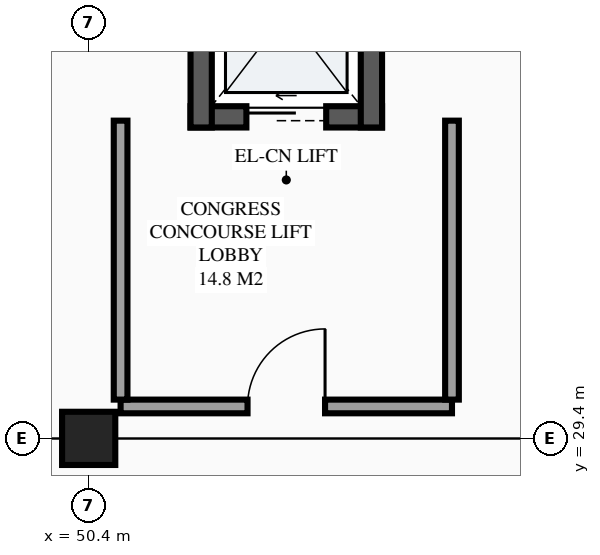
"""IFC4 building model, lengths in metres.
Left out: names, types, materials, properties, quantities, classifications, styles, units other than length and angle.
Written with IfcOpenShell. Run it as: python <this file> out.ifc"""

import sys

from ifc_helpers import new_model, si_unit, direction, frame, frame_2d, origin, origin_2d, place, context, subcontext, project, spatial, rectangle, extrude, element, fill, save


model = new_model("IFC4")
c1 = context("Model", 3, precision=1e-05, world=origin(), true_north=direction((0.0, 1.0)))
c2 = subcontext(c1, "Body", "Model", "MODEL_VIEW")
j1 = project(units=[si_unit("LENGTHUNIT", "METRE"), si_unit("PLANEANGLEUNIT", "RADIAN")], contexts=[c1])
p1 = place(None, origin())
s1 = spatial("IfcSite", under=j1, at=p1, CompositionType="ELEMENT")
p2 = place(p1, origin())
s2 = spatial("IfcBuilding", under=s1, at=p2, CompositionType="ELEMENT")
p3 = place(p2, frame((0.0, 0.0, 9.9)))
s3 = spatial("IfcBuildingStorey", under=s2, at=p3, CompositionType="ELEMENT", Elevation=9.9)
p4 = place(p3, frame((50.4, 29.4, 0.0), z_axis=(0.0, 0.0, 1.0), x_axis=(1.0, 0.0, 0.0)))
e1 = element("IfcColumn", 1, at=p4, inside=s3, PredefinedType="COLUMN", context=c2, shape_type="SweptSolid", body=[
    extrude(rectangle(XDim=0.7, YDim=0.7, at=origin_2d()), origin(), (0.0, 0.0, 1.0), 4.2),
])
p5 = place(p3, frame((51.74, 33.63, 0.0), z_axis=(0.0, 0.0, 1.0), x_axis=(1.0, 0.0, 0.0)))
e2 = element("IfcWall", 2, at=p5, inside=s3, PredefinedType="SHEAR", context=c2, shape_type="SweptSolid", body=[
    extrude(rectangle(XDim=2.52, YDim=0.28, at=frame_2d((1.26, 0.0))), origin(), (0.0, 0.0, 1.0), 4.2),
])
p6 = place(p5, frame((0.735, 0.0, 0.0)))
e3 = element("IfcOpeningElement", 3, at=p6, cuts=e2, PredefinedType="OPENING", context=c2, shape_type="SweptSolid", body=[
    extrude(rectangle(XDim=1.05, YDim=2.2, at=frame_2d((0.525, 1.1))), frame((0.0, 0.15, 0.0), z_axis=(0.0, -1.0, 0.0), x_axis=(1.0, 0.0, 0.0)), (0.0, 0.0, 1.0), 0.3),
])
for number, where, z_axis, x_axis in (
    (4, (54.12, 33.49, 0.0), (0.0, 0.0, 1.0), (0.0, 1.0, 0.0)),
    (5, (51.88, 36.51, 0.0), (0.0, 0.0, 1.0), (0.0, -1.0, 0.0)),
):
    element("IfcWall", number, at=place(p3, frame(where, z_axis=z_axis, x_axis=x_axis)), inside=s3, PredefinedType="SHEAR", context=c2, shape_type="SweptSolid", body=[
        extrude(rectangle(XDim=3.02, YDim=0.28, at=frame_2d((1.51, 0.0))), origin(), (0.0, 0.0, 1.0), 4.2),
    ])
p7 = place(p3, frame((50.82, 29.82, 0.0), z_axis=(0.0, 0.0, 1.0), x_axis=(1.0, 0.0, 0.0)))
e6 = element("IfcWall", 6, at=p7, inside=s3, PredefinedType="PARTITIONING", context=c2, shape_type="SweptSolid", body=[
    extrude(rectangle(XDim=4.36, YDim=0.18, at=frame_2d((2.18, 0.0))), origin(), (0.0, 0.0, 1.0), 3.955),
])
p8 = place(p7, frame((1.67, 0.0, 0.0)))
e7 = element("IfcOpeningElement", 7, at=p8, cuts=e6, PredefinedType="OPENING", context=c2, shape_type="SweptSolid", body=[
    extrude(rectangle(XDim=1.02, YDim=2.15, at=frame_2d((0.51, 1.075))), frame((0.0, 0.1, 0.0), z_axis=(0.0, -1.0, 0.0), x_axis=(1.0, 0.0, 0.0)), (0.0, 0.0, 1.0), 0.2),
])
for number, where, z_axis, x_axis in (
    (8, (50.82, 29.91, 0.0), (0.0, 0.0, 1.0), (0.0, 1.0, 0.0)),
    (9, (55.18, 29.91, 0.0), (0.0, 0.0, 1.0), (0.0, 1.0, 0.0)),
):
    element("IfcWall", number, at=place(p3, frame(where, z_axis=z_axis, x_axis=x_axis)), inside=s3, PredefinedType="PARTITIONING", context=c2, shape_type="SweptSolid", body=[
        extrude(rectangle(XDim=3.67, YDim=0.18, at=frame_2d((1.835, 0.0))), origin(), (0.0, 0.0, 1.0), 3.955),
    ])
p9 = place(p6, origin())
e10 = element("IfcDoor", 10, at=p9, inside=s3, OperationType="SLIDING_TO_LEFT", PredefinedType="DOOR", context=c2, shape_type="SweptSolid", body=[
    extrude(rectangle(XDim=1.05, YDim=2.2, at=frame_2d((0.525, 1.1))), frame((0.0, 0.025, 0.0), z_axis=(0.0, -1.0, 0.0), x_axis=(1.0, 0.0, 0.0)), (0.0, 0.0, 1.0), 0.05),
])
fill(e3, e10)
p10 = place(p8, origin())
e11 = element("IfcDoor", 11, at=p10, inside=s3, OperationType="SINGLE_SWING_RIGHT", PredefinedType="DOOR", context=c2, shape_type="SweptSolid", body=[
    extrude(rectangle(XDim=1.02, YDim=2.15, at=frame_2d((0.51, 1.075))), frame((0.0, 0.025, 0.0), z_axis=(0.0, -1.0, 0.0), x_axis=(1.0, 0.0, 0.0)), (0.0, 0.0, 1.0), 0.05),
])
fill(e7, e11)
save(model, sys.argv[1])
